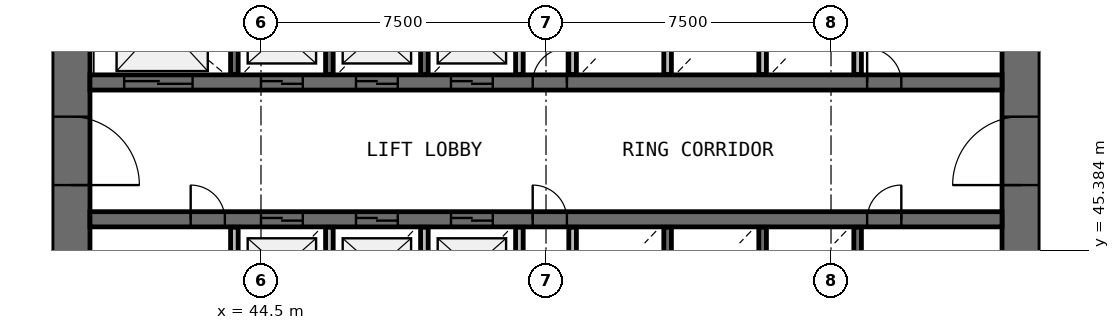
"""IFC4 building model, lengths in metres.
Left out: names, types, materials, properties, quantities, classifications, styles, units other than length and angle.
Written with IfcOpenShell. Run it as: python <this file> out.ifc"""

import sys

from ifc_helpers import new_model, si_unit, direction, frame, frame_2d, origin, place, context, subcontext, project, spatial, rectangle, extrude, source, transform, mapped, element, fill, save


model = new_model("IFC4")
c1 = context("Model", 3, precision=1e-05, world=origin(), true_north=direction((0.0, 1.0)))
c2 = subcontext(c1, "Body", "Model", "MODEL_VIEW")
j1 = project(units=[si_unit("LENGTHUNIT", "METRE"), si_unit("PLANEANGLEUNIT", "RADIAN")], contexts=[c1])
p1 = place(None, origin())
s1 = spatial("IfcSite", under=j1, at=p1, CompositionType="ELEMENT")
p2 = place(p1, origin())
s2 = spatial("IfcBuilding", under=s1, at=p2, CompositionType="ELEMENT")
p3 = place(p2, frame((0.0, 0.0, 49.0)))
s3 = spatial("IfcBuildingStorey", under=s2, at=p3, CompositionType="ELEMENT", Elevation=49.0)
p4 = place(p3, frame((64.5, 38.0, 0.0), z_axis=(0.0, 0.0, 1.0), x_axis=(0.0, 1.0, 0.0)))
e1 = element("IfcWall", 1, at=p4, inside=s3, PredefinedType="SHEAR", context=c2, shape_type="SweptSolid", body=[
    extrude(rectangle(XDim=20.0, YDim=1.0, at=frame_2d((10.0, 0.0))), origin(), (0.0, 0.0, 1.0), 4.4),
])
p5 = place(p4, frame((9.1, 0.0, 0.0)))
e2 = element("IfcOpeningElement", 2, at=p5, cuts=e1, PredefinedType="OPENING", context=c2, shape_type="SweptSolid", body=[
    extrude(rectangle(XDim=1.8, YDim=2.1, at=frame_2d((0.9, 1.05))), frame((0.0, 0.51, 0.0), z_axis=(0.0, -1.0, 0.0), x_axis=(1.0, 0.0, 0.0)), (0.0, 0.0, 1.0), 1.02),
])
p6 = place(p3, frame((39.5, 58.0, 0.0), z_axis=(0.0, 0.0, 1.0), x_axis=(0.0, -1.0, 0.0)))
e3 = element("IfcWall", 3, at=p6, inside=s3, PredefinedType="SHEAR", context=c2, shape_type="SweptSolid", body=[
    extrude(rectangle(XDim=20.0, YDim=1.0, at=frame_2d((10.0, 0.0))), origin(), (0.0, 0.0, 1.0), 4.4),
])
p7 = place(p6, frame((9.1, 0.0, 0.0)))
e4 = element("IfcOpeningElement", 4, at=p7, cuts=e3, PredefinedType="OPENING", context=c2, shape_type="SweptSolid", body=[
    extrude(rectangle(XDim=1.8, YDim=2.1, at=frame_2d((0.9, 1.05))), frame((0.0, 0.51, 0.0), z_axis=(0.0, -1.0, 0.0), x_axis=(1.0, 0.0, 0.0)), (0.0, 0.0, 1.0), 1.02),
])
p8 = place(p3, frame((40.0, 49.8, 0.0), z_axis=(0.0, 0.0, 1.0), x_axis=(1.0, 0.0, 0.0)))
e5 = element("IfcWall", 5, at=p8, inside=s3, PredefinedType="SHEAR", context=c2, shape_type="SweptSolid", body=[
    extrude(rectangle(XDim=24.0, YDim=0.4, at=frame_2d((12.0, 0.0))), origin(), (0.0, 0.0, 1.0), 4.4),
])
p9 = place(p8, frame((4.5, 0.0, 0.0)))
e6 = element("IfcOpeningElement", 6, at=p9, cuts=e5, PredefinedType="OPENING", context=c2, shape_type="SweptSolid", body=[
    extrude(rectangle(XDim=1.1, YDim=2.1, at=frame_2d((0.55, 1.05))), frame((0.0, 0.21, 0.0), z_axis=(0.0, -1.0, 0.0), x_axis=(1.0, 0.0, 0.0)), (0.0, 0.0, 1.0), 0.42),
])
p10 = place(p8, frame((7.0, 0.0, 0.0)))
e7 = element("IfcOpeningElement", 7, at=p10, cuts=e5, PredefinedType="OPENING", context=c2, shape_type="SweptSolid", body=[
    extrude(rectangle(XDim=1.1, YDim=2.1, at=frame_2d((0.55, 1.05))), frame((0.0, 0.21, 0.0), z_axis=(0.0, -1.0, 0.0), x_axis=(1.0, 0.0, 0.0)), (0.0, 0.0, 1.0), 0.42),
])
p11 = place(p8, frame((9.5, 0.0, 0.0)))
e8 = element("IfcOpeningElement", 8, at=p11, cuts=e5, PredefinedType="OPENING", context=c2, shape_type="SweptSolid", body=[
    extrude(rectangle(XDim=1.1, YDim=2.1, at=frame_2d((0.55, 1.05))), frame((0.0, 0.21, 0.0), z_axis=(0.0, -1.0, 0.0), x_axis=(1.0, 0.0, 0.0)), (0.0, 0.0, 1.0), 0.42),
])
p12 = place(p8, frame((0.9, 0.0, 0.0)))
e9 = element("IfcOpeningElement", 9, at=p12, cuts=e5, PredefinedType="OPENING", context=c2, shape_type="SweptSolid", body=[
    extrude(rectangle(XDim=1.8, YDim=2.4, at=frame_2d((0.9, 1.2))), frame((0.0, 0.21, 0.0), z_axis=(0.0, -1.0, 0.0), x_axis=(1.0, 0.0, 0.0)), (0.0, 0.0, 1.0), 0.42),
])
p13 = place(p8, frame((20.45, 0.0, 0.0)))
e10 = element("IfcOpeningElement", 10, at=p13, cuts=e5, PredefinedType="OPENING", context=c2, shape_type="SweptSolid", body=[
    extrude(rectangle(XDim=0.9, YDim=2.1, at=frame_2d((0.45, 1.05))), frame((0.0, 0.21, 0.0), z_axis=(0.0, -1.0, 0.0), x_axis=(1.0, 0.0, 0.0)), (0.0, 0.0, 1.0), 0.42),
])
p14 = place(p8, frame((11.65, 0.0, 0.0)))
e11 = element("IfcOpeningElement", 11, at=p14, cuts=e5, PredefinedType="OPENING", context=c2, shape_type="SweptSolid", body=[
    extrude(rectangle(XDim=0.9, YDim=2.1, at=frame_2d((0.45, 1.05))), frame((0.0, 0.21, 0.0), z_axis=(0.0, -1.0, 0.0), x_axis=(1.0, 0.0, 0.0)), (0.0, 0.0, 1.0), 0.42),
])
p15 = place(p3, frame((40.0, 46.2, 0.0), z_axis=(0.0, 0.0, 1.0), x_axis=(1.0, 0.0, 0.0)))
e12 = element("IfcWall", 12, at=p15, inside=s3, PredefinedType="SHEAR", context=c2, shape_type="SweptSolid", body=[
    extrude(rectangle(XDim=24.0, YDim=0.4, at=frame_2d((12.0, 0.0))), origin(), (0.0, 0.0, 1.0), 4.4),
])
p16 = place(p15, frame((4.5, 0.0, 0.0)))
e13 = element("IfcOpeningElement", 13, at=p16, cuts=e12, PredefinedType="OPENING", context=c2, shape_type="SweptSolid", body=[
    extrude(rectangle(XDim=1.1, YDim=2.1, at=frame_2d((0.55, 1.05))), frame((0.0, 0.21, 0.0), z_axis=(0.0, -1.0, 0.0), x_axis=(1.0, 0.0, 0.0)), (0.0, 0.0, 1.0), 0.42),
])
p17 = place(p15, frame((7.0, 0.0, 0.0)))
e14 = element("IfcOpeningElement", 14, at=p17, cuts=e12, PredefinedType="OPENING", context=c2, shape_type="SweptSolid", body=[
    extrude(rectangle(XDim=1.1, YDim=2.1, at=frame_2d((0.55, 1.05))), frame((0.0, 0.21, 0.0), z_axis=(0.0, -1.0, 0.0), x_axis=(1.0, 0.0, 0.0)), (0.0, 0.0, 1.0), 0.42),
])
p18 = place(p15, frame((9.5, 0.0, 0.0)))
e15 = element("IfcOpeningElement", 15, at=p18, cuts=e12, PredefinedType="OPENING", context=c2, shape_type="SweptSolid", body=[
    extrude(rectangle(XDim=1.1, YDim=2.1, at=frame_2d((0.55, 1.05))), frame((0.0, 0.21, 0.0), z_axis=(0.0, -1.0, 0.0), x_axis=(1.0, 0.0, 0.0)), (0.0, 0.0, 1.0), 0.42),
])
p19 = place(p15, frame((20.45, 0.0, 0.0)))
e16 = element("IfcOpeningElement", 16, at=p19, cuts=e12, PredefinedType="OPENING", context=c2, shape_type="SweptSolid", body=[
    extrude(rectangle(XDim=0.9, YDim=2.1, at=frame_2d((0.45, 1.05))), frame((0.0, 0.21, 0.0), z_axis=(0.0, -1.0, 0.0), x_axis=(1.0, 0.0, 0.0)), (0.0, 0.0, 1.0), 0.42),
])
p20 = place(p15, frame((2.65, 0.0, 0.0)))
e17 = element("IfcOpeningElement", 17, at=p20, cuts=e12, PredefinedType="OPENING", context=c2, shape_type="SweptSolid", body=[
    extrude(rectangle(XDim=0.9, YDim=2.1, at=frame_2d((0.45, 1.05))), frame((0.0, 0.21, 0.0), z_axis=(0.0, -1.0, 0.0), x_axis=(1.0, 0.0, 0.0)), (0.0, 0.0, 1.0), 0.42),
])
p21 = place(p15, frame((11.65, 0.0, 0.0)))
e18 = element("IfcOpeningElement", 18, at=p21, cuts=e12, PredefinedType="OPENING", context=c2, shape_type="SweptSolid", body=[
    extrude(rectangle(XDim=0.9, YDim=2.1, at=frame_2d((0.45, 1.05))), frame((0.0, 0.21, 0.0), z_axis=(0.0, -1.0, 0.0), x_axis=(1.0, 0.0, 0.0)), (0.0, 0.0, 1.0), 0.42),
])
for number, where, z_axis, x_axis in (
    (19, (43.8, 45.99, 0.0), (0.0, 0.0, 1.0), (0.0, -1.0, 0.0)),
    (20, (43.8, 52.37, 0.0), (0.0, 0.0, 1.0), (0.0, -1.0, 0.0)),
):
    element("IfcWall", number, at=place(p3, frame(where, z_axis=z_axis, x_axis=x_axis)), inside=s3, PredefinedType="SOLIDWALL", context=c2, shape_type="SweptSolid", body=[
        extrude(rectangle(XDim=2.36, YDim=0.2, at=frame_2d((1.18, 0.0))), origin(), (0.0, 0.0, 1.0), 3.95),
    ])
p22 = place(p3, frame((46.3, 43.6, 0.0), z_axis=(0.0, 0.0, 1.0), x_axis=(0.0, 1.0, 0.0)))
e21 = element("IfcWall", 21, at=p22, inside=s3, PredefinedType="SOLIDWALL", context=c2, shape_type="SweptSolid", body=[
    extrude(rectangle(XDim=2.39, YDim=0.2, at=frame_2d((1.195, 0.0))), origin(), (0.0, 0.0, 1.0), 3.95),
])
for number, where, z_axis, x_axis in (
    (22, (46.3, 50.01, 0.0), (0.0, 0.0, 1.0), (0.0, 1.0, 0.0)),
    (23, (48.8, 43.63, 0.0), (0.0, 0.0, 1.0), (0.0, 1.0, 0.0)),
    (24, (48.8, 50.01, 0.0), (0.0, 0.0, 1.0), (0.0, 1.0, 0.0)),
    (25, (51.3, 43.63, 0.0), (0.0, 0.0, 1.0), (0.0, 1.0, 0.0)),
):
    element("IfcWall", number, at=place(p3, frame(where, z_axis=z_axis, x_axis=x_axis)), inside=s3, PredefinedType="SOLIDWALL", context=c2, shape_type="SweptSolid", body=[
        extrude(rectangle(XDim=2.36, YDim=0.2, at=frame_2d((1.18, 0.0))), origin(), (0.0, 0.0, 1.0), 3.95),
    ])
for number, where, z_axis, x_axis in (
    (26, (51.3, 50.01, 0.0), (0.0, 0.0, 1.0), (0.0, 1.0, 0.0)),
    (27, (52.7, 45.99, 0.0), (0.0, 0.0, 1.0), (0.0, -1.0, 0.0)),
):
    element("IfcWall", number, at=place(p3, frame(where, z_axis=z_axis, x_axis=x_axis)), inside=s3, PredefinedType="SOLIDWALL", context=c2, shape_type="SweptSolid", body=[
        extrude(rectangle(XDim=2.39, YDim=0.2, at=frame_2d((1.195, 0.0))), origin(), (0.0, 0.0, 1.0), 3.95),
    ])
for number, where, z_axis, x_axis in (
    (28, (52.7, 52.37, 0.0), (0.0, 0.0, 1.0), (0.0, -1.0, 0.0)),
    (29, (55.2, 43.63, 0.0), (0.0, 0.0, 1.0), (0.0, 1.0, 0.0)),
    (30, (55.2, 50.01, 0.0), (0.0, 0.0, 1.0), (0.0, 1.0, 0.0)),
    (31, (57.7, 43.63, 0.0), (0.0, 0.0, 1.0), (0.0, 1.0, 0.0)),
):
    element("IfcWall", number, at=place(p3, frame(where, z_axis=z_axis, x_axis=x_axis)), inside=s3, PredefinedType="SOLIDWALL", context=c2, shape_type="SweptSolid", body=[
        extrude(rectangle(XDim=2.36, YDim=0.2, at=frame_2d((1.18, 0.0))), origin(), (0.0, 0.0, 1.0), 3.95),
    ])
p23 = place(p3, frame((57.7, 50.01, 0.0), z_axis=(0.0, 0.0, 1.0), x_axis=(0.0, 1.0, 0.0)))
e32 = element("IfcWall", 32, at=p23, inside=s3, PredefinedType="SOLIDWALL", context=c2, shape_type="SweptSolid", body=[
    extrude(rectangle(XDim=2.39, YDim=0.2, at=frame_2d((1.195, 0.0))), origin(), (0.0, 0.0, 1.0), 3.95),
])
for number, where, z_axis, x_axis in (
    (33, (60.2, 43.63, 0.0), (0.0, 0.0, 1.0), (0.0, 1.0, 0.0)),
    (34, (60.2, 50.01, 0.0), (0.0, 0.0, 1.0), (0.0, 1.0, 0.0)),
):
    element("IfcWall", number, at=place(p3, frame(where, z_axis=z_axis, x_axis=x_axis)), inside=s3, PredefinedType="SOLIDWALL", context=c2, shape_type="SweptSolid", body=[
        extrude(rectangle(XDim=2.36, YDim=0.2, at=frame_2d((1.18, 0.0))), origin(), (0.0, 0.0, 1.0), 3.95),
    ])
m1 = source(origin(), c2, "Body", "SweptSolid", [
    extrude(rectangle(XDim=1.8, YDim=2.1, at=frame_2d((0.9, 1.05))), frame((0.0, 0.025, 0.0), z_axis=(0.0, -1.0, 0.0), x_axis=(1.0, 0.0, 0.0)), (0.0, 0.0, 1.0), 0.05),
])
p24 = place(p7, origin())
e35 = element("IfcDoor", 35, at=p24, inside=s3, OperationType="SINGLE_SWING_RIGHT", PredefinedType="DOOR", context=c2, shape_type="MappedRepresentation", body=[
    mapped(m1, transform((0.0, 0.0, 0.0), scale=1.0)),
])
fill(e4, e35)
p25 = place(p5, origin())
e36 = element("IfcDoor", 36, at=p25, inside=s3, OperationType="SINGLE_SWING_LEFT", PredefinedType="DOOR", context=c2, shape_type="MappedRepresentation", body=[
    mapped(m1, transform((0.0, 0.0, 0.0), scale=1.0)),
])
fill(e2, e36)
m2 = source(origin(), c2, "Body", "SweptSolid", [
    extrude(rectangle(XDim=1.1, YDim=2.1, at=frame_2d((0.55, 1.05))), frame((0.0, 0.025, 0.0), z_axis=(0.0, -1.0, 0.0), x_axis=(1.0, 0.0, 0.0)), (0.0, 0.0, 1.0), 0.05),
])
p26 = place(p9, origin())
e37 = element("IfcDoor", 37, at=p26, inside=s3, OperationType="DOUBLE_DOOR_SLIDING", PredefinedType="USERDEFINED", context=c2, shape_type="MappedRepresentation", body=[
    mapped(m2, transform((0.0, 0.0, 0.0), scale=1.0)),
])
fill(e6, e37)
p27 = place(p10, origin())
e38 = element("IfcDoor", 38, at=p27, inside=s3, OperationType="DOUBLE_DOOR_SLIDING", PredefinedType="USERDEFINED", context=c2, shape_type="MappedRepresentation", body=[
    mapped(m2, transform((0.0, 0.0, 0.0), scale=1.0)),
])
fill(e7, e38)
p28 = place(p11, origin())
e39 = element("IfcDoor", 39, at=p28, inside=s3, OperationType="DOUBLE_DOOR_SLIDING", PredefinedType="USERDEFINED", context=c2, shape_type="MappedRepresentation", body=[
    mapped(m2, transform((0.0, 0.0, 0.0), scale=1.0)),
])
fill(e8, e39)
p29 = place(p16, origin())
e40 = element("IfcDoor", 40, at=p29, inside=s3, OperationType="DOUBLE_DOOR_SLIDING", PredefinedType="USERDEFINED", context=c2, shape_type="MappedRepresentation", body=[
    mapped(m2, transform((0.0, 0.0, 0.0), scale=1.0)),
])
fill(e13, e40)
p30 = place(p17, origin())
e41 = element("IfcDoor", 41, at=p30, inside=s3, OperationType="DOUBLE_DOOR_SLIDING", PredefinedType="USERDEFINED", context=c2, shape_type="MappedRepresentation", body=[
    mapped(m2, transform((0.0, 0.0, 0.0), scale=1.0)),
])
fill(e14, e41)
p31 = place(p18, origin())
e42 = element("IfcDoor", 42, at=p31, inside=s3, OperationType="DOUBLE_DOOR_SLIDING", PredefinedType="USERDEFINED", context=c2, shape_type="MappedRepresentation", body=[
    mapped(m2, transform((0.0, 0.0, 0.0), scale=1.0)),
])
fill(e15, e42)
m3 = source(origin(), c2, "Body", "SweptSolid", [
    extrude(rectangle(XDim=1.8, YDim=2.4, at=frame_2d((0.9, 1.2))), frame((0.0, 0.025, 0.0), z_axis=(0.0, -1.0, 0.0), x_axis=(1.0, 0.0, 0.0)), (0.0, 0.0, 1.0), 0.05),
])
p32 = place(p12, origin())
e43 = element("IfcDoor", 43, at=p32, inside=s3, OperationType="DOUBLE_DOOR_SLIDING", PredefinedType="USERDEFINED", context=c2, shape_type="MappedRepresentation", body=[
    mapped(m3, transform((0.0, 0.0, 0.0), scale=1.0)),
])
fill(e9, e43)
m4 = source(origin(), c2, "Body", "SweptSolid", [
    extrude(rectangle(XDim=0.9, YDim=2.1, at=frame_2d((0.45, 1.05))), frame((0.0, 0.025, 0.0), z_axis=(0.0, -1.0, 0.0), x_axis=(1.0, 0.0, 0.0)), (0.0, 0.0, 1.0), 0.05),
])
p33 = place(p19, origin())
e44 = element("IfcDoor", 44, at=p33, inside=s3, OperationType="SINGLE_SWING_RIGHT", PredefinedType="DOOR", context=c2, shape_type="MappedRepresentation", body=[
    mapped(m4, transform((0.0, 0.0, 0.0), scale=1.0)),
])
fill(e16, e44)
p34 = place(p13, origin())
e45 = element("IfcDoor", 45, at=p34, inside=s3, OperationType="SINGLE_SWING_LEFT", PredefinedType="DOOR", context=c2, shape_type="MappedRepresentation", body=[
    mapped(m4, transform((0.0, 0.0, 0.0), scale=1.0)),
])
fill(e10, e45)
p35 = place(p20, origin())
e46 = element("IfcDoor", 46, at=p35, inside=s3, OperationType="SINGLE_SWING_LEFT", PredefinedType="DOOR", context=c2, shape_type="MappedRepresentation", body=[
    mapped(m4, transform((0.0, 0.0, 0.0), scale=1.0)),
])
fill(e17, e46)
p36 = place(p14, origin())
e47 = element("IfcDoor", 47, at=p36, inside=s3, OperationType="SINGLE_SWING_RIGHT", PredefinedType="DOOR", context=c2, shape_type="MappedRepresentation", body=[
    mapped(m4, transform((0.0, 0.0, 0.0), scale=1.0)),
])
fill(e11, e47)
p37 = place(p21, origin())
e48 = element("IfcDoor", 48, at=p37, inside=s3, OperationType="SINGLE_SWING_LEFT", PredefinedType="DOOR", context=c2, shape_type="MappedRepresentation", body=[
    mapped(m4, transform((0.0, 0.0, 0.0), scale=1.0)),
])
fill(e18, e48)
save(model, sys.argv[1])
